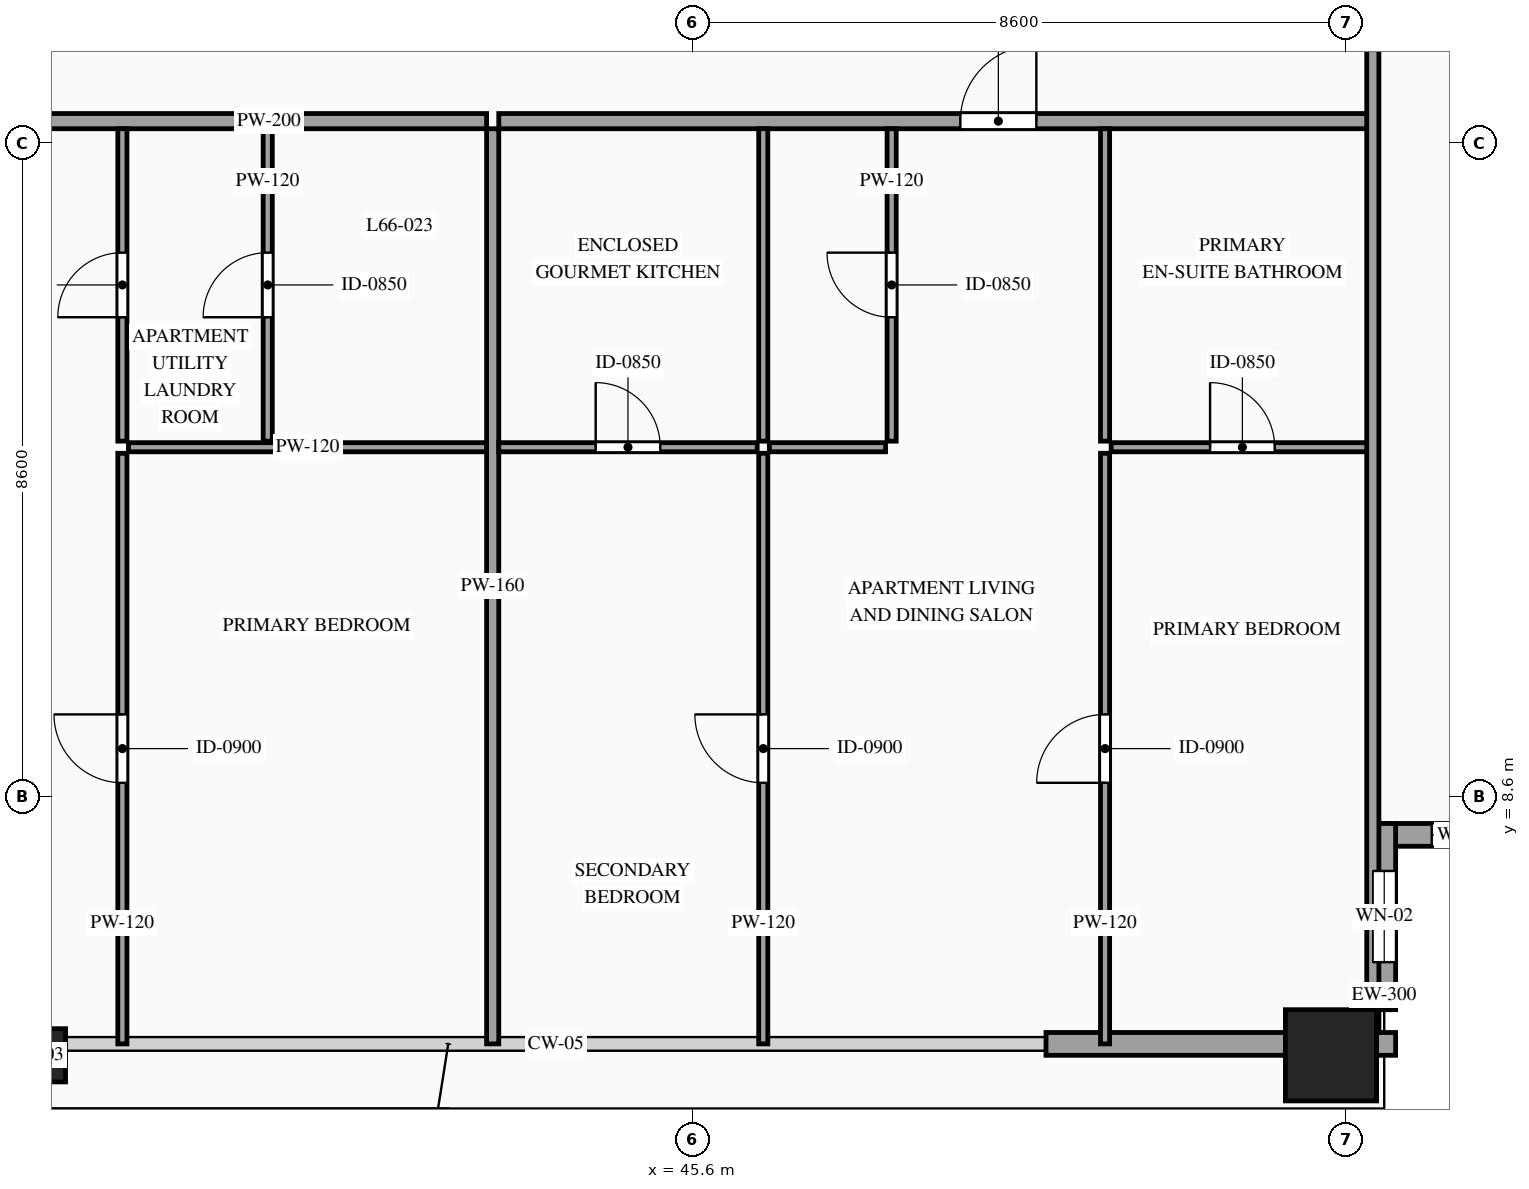
"""IFC4 building model, lengths in metres.
Left out: names, types, materials, properties, quantities, classifications, styles, units other than length and angle.
Written with IfcOpenShell. Run it as: python <this file> out.ifc"""

import sys

from ifc_helpers import new_model, si_unit, direction, frame, frame_2d, origin, origin_2d, place, context, subcontext, project, spatial, rectangle, hollow_rectangle, extrude, source, transform, mapped, element, fill, save


model = new_model("IFC4")
c1 = context("Model", 3, precision=1e-05, world=origin(), true_north=direction((0.0, 1.0)))
c2 = subcontext(c1, "Body", "Model", "MODEL_VIEW")
j1 = project(units=[si_unit("LENGTHUNIT", "METRE"), si_unit("PLANEANGLEUNIT", "RADIAN")], contexts=[c1])
p1 = place(None, origin())
s1 = spatial("IfcSite", under=j1, at=p1, CompositionType="ELEMENT")
p2 = place(p1, origin())
s2 = spatial("IfcBuilding", under=s1, at=p2, CompositionType="ELEMENT")
p3 = place(p2, frame((0.0, 0.0, 248.6)))
s3 = spatial("IfcBuildingStorey", under=s2, at=p3, CompositionType="ELEMENT", Elevation=248.6)
m1 = source(origin(), c2, "Body", "SweptSolid", [
    extrude(hollow_rectangle(XDim=0.7, YDim=0.7, WallThickness=0.032, at=origin_2d()), origin(), (0.0, 0.0, 1.0), 3.5),
])
p4 = place(p3, frame((37.0, 5.2, 0.0), z_axis=(0.0, 0.0, 1.0), x_axis=(1.0, 0.0, 0.0)))
e1 = element("IfcColumn", 1, at=p4, inside=s3, PredefinedType="COLUMN", context=c2, shape_type="MappedRepresentation", body=[
    mapped(m1, transform((0.0, 0.0, 0.0), scale=1.0)),
])
m2 = source(origin(), c2, "Body", "SweptSolid", [
    extrude(hollow_rectangle(XDim=1.2, YDim=1.2, WallThickness=0.055, at=origin_2d()), origin(), (0.0, 0.0, 1.0), 3.5),
])
p5 = place(p3, frame((54.0, 5.2, 0.0), z_axis=(0.0, 0.0, 1.0), x_axis=(1.0, 0.0, 0.0)))
e2 = element("IfcColumn", 2, at=p5, inside=s3, PredefinedType="COLUMN", context=c2, shape_type="MappedRepresentation", body=[
    mapped(m2, transform((0.0, 0.0, 0.0), scale=1.0)),
])
p6 = place(p3, frame((54.55, 8.1, 0.0), z_axis=(0.0, 0.0, 1.0), x_axis=(1.0, 0.0, 0.0)))
e3 = element("IfcWall", 3, at=p6, inside=s3, PredefinedType="SOLIDWALL", context=c2, shape_type="SweptSolid", body=[
    extrude(rectangle(XDim=2.45, YDim=0.3, at=frame_2d((1.225, 0.0))), origin(), (0.0, 0.0, 1.0), 3.28),
])
p7 = place(p6, frame((0.775, 0.0, 0.85)))
e4 = element("IfcOpeningElement", 4, at=p7, cuts=e3, PredefinedType="OPENING", context=c2, shape_type="SweptSolid", body=[
    extrude(rectangle(XDim=0.9, YDim=1.5, at=frame_2d((0.45, 0.75))), frame((0.0, 0.165, 0.0), z_axis=(0.0, -1.0, 0.0), x_axis=(1.0, 0.0, 0.0)), (0.0, 0.0, 1.0), 0.33),
])
p8 = place(p3, frame((54.7, 5.8, 0.0), z_axis=(0.0, 0.0, 1.0), x_axis=(0.0, 1.0, 0.0)))
e5 = element("IfcWall", 5, at=p8, inside=s3, PredefinedType="SOLIDWALL", context=c2, shape_type="SweptSolid", body=[
    extrude(rectangle(XDim=2.45, YDim=0.3, at=frame_2d((1.225, 0.0))), origin(), (0.0, 0.0, 1.0), 3.28),
])
p9 = place(p8, frame((0.625, 0.0, 0.85)))
e6 = element("IfcOpeningElement", 6, at=p9, cuts=e5, PredefinedType="OPENING", context=c2, shape_type="SweptSolid", body=[
    extrude(rectangle(XDim=1.2, YDim=2.1, at=frame_2d((0.6, 1.05))), frame((0.0, 0.165, 0.0), z_axis=(0.0, -1.0, 0.0), x_axis=(1.0, 0.0, 0.0)), (0.0, 0.0, 1.0), 0.33),
])
m3 = source(origin(), c2, "Body", "SweptSolid", [
    extrude(rectangle(XDim=0.25, YDim=0.3, at=frame_2d((0.125, 0.0))), origin(), (0.0, 0.0, 1.0), 3.28),
])
p10 = place(p3, frame((54.6, 5.35, 0.0), z_axis=(0.0, 0.0, 1.0), x_axis=(1.0, 0.0, 0.0)))
e7 = element("IfcWall", 7, at=p10, inside=s3, PredefinedType="SOLIDWALL", context=c2, shape_type="MappedRepresentation", body=[
    mapped(m3, transform((0.0, 0.0, 0.0), scale=1.0)),
])
m4 = source(origin(), c2, "Body", "SweptSolid", [
    extrude(rectangle(XDim=3.15, YDim=0.3, at=frame_2d((1.575, 0.0))), origin(), (0.0, 0.0, 1.0), 2.835),
])
p11 = place(p3, frame((50.25, 5.35, 0.0), z_axis=(0.0, 0.0, 1.0), x_axis=(1.0, 0.0, 0.0)))
e8 = element("IfcWall", 8, at=p11, inside=s3, PredefinedType="SOLIDWALL", context=c2, shape_type="MappedRepresentation", body=[
    mapped(m4, transform((0.0, 0.0, 0.0), scale=1.0)),
])
p12 = place(p3, frame((31.11, 17.49, 0.0), z_axis=(0.0, 0.0, 1.0), x_axis=(1.0, 0.0, 0.0)))
e9 = element("IfcWall", 9, at=p12, inside=s3, PredefinedType="PARTITIONING", context=c2, shape_type="SweptSolid", body=[
    extrude(rectangle(XDim=11.78, YDim=0.2, at=frame_2d((5.89, 0.0))), origin(), (0.0, 0.0, 1.0), 3.28),
])
p13 = place(p12, frame((4.801, 0.0, 0.0)))
e10 = element("IfcOpeningElement", 10, at=p13, cuts=e9, PredefinedType="OPENING", context=c2, shape_type="SweptSolid", body=[
    extrude(rectangle(XDim=1.0, YDim=2.2, at=frame_2d((0.5, 1.1))), frame((0.0, 0.115, 0.0), z_axis=(0.0, -1.0, 0.0), x_axis=(1.0, 0.0, 0.0)), (0.0, 0.0, 1.0), 0.23),
])
m5 = source(origin(), c2, "Body", "SweptSolid", [
    extrude(rectangle(XDim=12.04, YDim=0.16, at=frame_2d((6.02, 0.0))), origin(), (0.0, 0.0, 1.0), 3.28),
])
p14 = place(p3, frame((42.97, 5.35, 0.0), z_axis=(0.0, 0.0, 1.0), x_axis=(0.0, 1.0, 0.0)))
e11 = element("IfcWall", 11, at=p14, inside=s3, PredefinedType="PARTITIONING", context=c2, shape_type="MappedRepresentation", body=[
    mapped(m5, transform((0.0, 0.0, 0.0), scale=1.0)),
])
p15 = place(p3, frame((40.01, 13.28, 0.0), z_axis=(0.0, 0.0, 1.0), x_axis=(0.0, 1.0, 0.0)))
e12 = element("IfcWall", 12, at=p15, inside=s3, PredefinedType="PARTITIONING", context=c2, shape_type="SweptSolid", body=[
    extrude(rectangle(XDim=4.11, YDim=0.12, at=frame_2d((2.055, 0.0))), origin(), (0.0, 0.0, 1.0), 3.28),
])
p16 = place(p15, frame((1.63, 0.0, 0.0)))
e13 = element("IfcOpeningElement", 13, at=p16, cuts=e12, PredefinedType="OPENING", context=c2, shape_type="SweptSolid", body=[
    extrude(rectangle(XDim=0.85, YDim=2.1, at=frame_2d((0.425, 1.05))), frame((0.0, 0.075, 0.0), z_axis=(0.0, -1.0, 0.0), x_axis=(1.0, 0.0, 0.0)), (0.0, 0.0, 1.0), 0.15),
])
m6 = source(origin(), c2, "Body", "SweptSolid", [
    extrude(rectangle(XDim=4.712, YDim=0.12, at=frame_2d((2.356, 0.0))), origin(), (0.0, 0.0, 1.0), 3.28),
])
p17 = place(p3, frame((38.178, 13.2, 0.0), z_axis=(0.0, 0.0, 1.0), x_axis=(1.0, 0.0, 0.0)))
e14 = element("IfcWall", 14, at=p17, inside=s3, PredefinedType="PARTITIONING", context=c2, shape_type="MappedRepresentation", body=[
    mapped(m6, transform((0.0, 0.0, 0.0), scale=1.0)),
])
p18 = place(p3, frame((38.098, 5.35, 0.0), z_axis=(0.0, 0.0, 1.0), x_axis=(0.0, 1.0, 0.0)))
e15 = element("IfcWall", 15, at=p18, inside=s3, PredefinedType="PARTITIONING", context=c2, shape_type="SweptSolid", body=[
    extrude(rectangle(XDim=7.77, YDim=0.12, at=frame_2d((3.885, 0.0))), origin(), (0.0, 0.0, 1.0), 3.28),
])
p19 = place(p18, frame((3.435, 0.0, 0.0)))
e16 = element("IfcOpeningElement", 16, at=p19, cuts=e15, PredefinedType="OPENING", context=c2, shape_type="SweptSolid", body=[
    extrude(rectangle(XDim=0.9, YDim=2.15, at=frame_2d((0.45, 1.075))), frame((0.0, 0.075, 0.0), z_axis=(0.0, -1.0, 0.0), x_axis=(1.0, 0.0, 0.0)), (0.0, 0.0, 1.0), 0.15),
])
p20 = place(p3, frame((38.098, 13.28, 0.0), z_axis=(0.0, 0.0, 1.0), x_axis=(0.0, 1.0, 0.0)))
e17 = element("IfcWall", 17, at=p20, inside=s3, PredefinedType="PARTITIONING", context=c2, shape_type="SweptSolid", body=[
    extrude(rectangle(XDim=4.11, YDim=0.12, at=frame_2d((2.055, 0.0))), origin(), (0.0, 0.0, 1.0), 3.28),
])
p21 = place(p20, frame((1.63, 0.0, 0.0)))
e18 = element("IfcOpeningElement", 18, at=p21, cuts=e17, PredefinedType="OPENING", context=c2, shape_type="SweptSolid", body=[
    extrude(rectangle(XDim=0.85, YDim=2.1, at=frame_2d((0.425, 1.05))), frame((0.0, 0.075, 0.0), z_axis=(0.0, -1.0, 0.0), x_axis=(1.0, 0.0, 0.0)), (0.0, 0.0, 1.0), 0.15),
])
p22 = place(p3, frame((43.05, 17.49, 0.0), z_axis=(0.0, 0.0, 1.0), x_axis=(1.0, 0.0, 0.0)))
e19 = element("IfcWall", 19, at=p22, inside=s3, PredefinedType="PARTITIONING", context=c2, shape_type="SweptSolid", body=[
    extrude(rectangle(XDim=11.51, YDim=0.2, at=frame_2d((5.755, 0.0))), origin(), (0.0, 0.0, 1.0), 3.28),
])
p23 = place(p22, frame((6.073, 0.0, 0.0)))
e20 = element("IfcOpeningElement", 20, at=p23, cuts=e19, PredefinedType="OPENING", context=c2, shape_type="SweptSolid", body=[
    extrude(rectangle(XDim=1.0, YDim=2.2, at=frame_2d((0.5, 1.1))), frame((0.0, 0.115, 0.0), z_axis=(0.0, -1.0, 0.0), x_axis=(1.0, 0.0, 0.0)), (0.0, 0.0, 1.0), 0.23),
])
p24 = place(p3, frame((43.05, 13.2, 0.0), z_axis=(0.0, 0.0, 1.0), x_axis=(1.0, 0.0, 0.0)))
e21 = element("IfcWall", 21, at=p24, inside=s3, PredefinedType="PARTITIONING", context=c2, shape_type="SweptSolid", body=[
    extrude(rectangle(XDim=3.4, YDim=0.12, at=frame_2d((1.7, 0.0))), origin(), (0.0, 0.0, 1.0), 3.28),
])
p25 = place(p24, frame((1.275, 0.0, 0.0)))
e22 = element("IfcOpeningElement", 22, at=p25, cuts=e21, PredefinedType="OPENING", context=c2, shape_type="SweptSolid", body=[
    extrude(rectangle(XDim=0.85, YDim=2.1, at=frame_2d((0.425, 1.05))), frame((0.0, 0.075, 0.0), z_axis=(0.0, -1.0, 0.0), x_axis=(1.0, 0.0, 0.0)), (0.0, 0.0, 1.0), 0.15),
])
m7 = source(origin(), c2, "Body", "SweptSolid", [
    extrude(rectangle(XDim=4.11, YDim=0.12, at=frame_2d((2.055, 0.0))), origin(), (0.0, 0.0, 1.0), 3.28),
])
p26 = place(p3, frame((46.53, 13.28, 0.0), z_axis=(0.0, 0.0, 1.0), x_axis=(0.0, 1.0, 0.0)))
e23 = element("IfcWall", 23, at=p26, inside=s3, PredefinedType="PARTITIONING", context=c2, shape_type="MappedRepresentation", body=[
    mapped(m7, transform((0.0, 0.0, 0.0), scale=1.0)),
])
m8 = source(origin(), c2, "Body", "SweptSolid", [
    extrude(rectangle(XDim=1.529, YDim=0.12, at=frame_2d((0.764, 0.0))), origin(), (0.0, 0.0, 1.0), 3.28),
])
p27 = place(p3, frame((46.61, 13.2, 0.0), z_axis=(0.0, 0.0, 1.0), x_axis=(1.0, 0.0, 0.0)))
e24 = element("IfcWall", 24, at=p27, inside=s3, PredefinedType="PARTITIONING", context=c2, shape_type="MappedRepresentation", body=[
    mapped(m8, transform((0.0, 0.0, 0.0), scale=1.0)),
])
p28 = place(p3, frame((48.219, 13.28, 0.0), z_axis=(0.0, 0.0, 1.0), x_axis=(0.0, 1.0, 0.0)))
e25 = element("IfcWall", 25, at=p28, inside=s3, PredefinedType="PARTITIONING", context=c2, shape_type="SweptSolid", body=[
    extrude(rectangle(XDim=4.11, YDim=0.12, at=frame_2d((2.055, 0.0))), origin(), (0.0, 0.0, 1.0), 3.28),
])
p29 = place(p28, frame((1.63, 0.0, 0.0)))
e26 = element("IfcOpeningElement", 26, at=p29, cuts=e25, PredefinedType="OPENING", context=c2, shape_type="SweptSolid", body=[
    extrude(rectangle(XDim=0.85, YDim=2.1, at=frame_2d((0.425, 1.05))), frame((0.0, 0.075, 0.0), z_axis=(0.0, -1.0, 0.0), x_axis=(1.0, 0.0, 0.0)), (0.0, 0.0, 1.0), 0.15),
])
p30 = place(p3, frame((51.107, 13.2, 0.0), z_axis=(0.0, 0.0, 1.0), x_axis=(1.0, 0.0, 0.0)))
e27 = element("IfcWall", 27, at=p30, inside=s3, PredefinedType="PARTITIONING", context=c2, shape_type="SweptSolid", body=[
    extrude(rectangle(XDim=3.453, YDim=0.12, at=frame_2d((1.727, 0.0))), origin(), (0.0, 0.0, 1.0), 3.28),
])
p31 = place(p30, frame((1.302, 0.0, 0.0)))
e28 = element("IfcOpeningElement", 28, at=p31, cuts=e27, PredefinedType="OPENING", context=c2, shape_type="SweptSolid", body=[
    extrude(rectangle(XDim=0.85, YDim=2.1, at=frame_2d((0.425, 1.05))), frame((0.0, 0.075, 0.0), z_axis=(0.0, -1.0, 0.0), x_axis=(1.0, 0.0, 0.0)), (0.0, 0.0, 1.0), 0.15),
])
p32 = place(p3, frame((51.027, 13.28, 0.0), z_axis=(0.0, 0.0, 1.0), x_axis=(0.0, 1.0, 0.0)))
e29 = element("IfcWall", 29, at=p32, inside=s3, PredefinedType="PARTITIONING", context=c2, shape_type="MappedRepresentation", body=[
    mapped(m7, transform((0.0, 0.0, 0.0), scale=1.0)),
])
p33 = place(p3, frame((46.53, 5.35, 0.0), z_axis=(0.0, 0.0, 1.0), x_axis=(0.0, 1.0, 0.0)))
e30 = element("IfcWall", 30, at=p33, inside=s3, PredefinedType="PARTITIONING", context=c2, shape_type="SweptSolid", body=[
    extrude(rectangle(XDim=7.77, YDim=0.12, at=frame_2d((3.885, 0.0))), origin(), (0.0, 0.0, 1.0), 3.28),
])
p34 = place(p33, frame((3.435, 0.0, 0.0)))
e31 = element("IfcOpeningElement", 31, at=p34, cuts=e30, PredefinedType="OPENING", context=c2, shape_type="SweptSolid", body=[
    extrude(rectangle(XDim=0.9, YDim=2.15, at=frame_2d((0.45, 1.075))), frame((0.0, 0.075, 0.0), z_axis=(0.0, -1.0, 0.0), x_axis=(1.0, 0.0, 0.0)), (0.0, 0.0, 1.0), 0.15),
])
p35 = place(p3, frame((51.027, 5.35, 0.0), z_axis=(0.0, 0.0, 1.0), x_axis=(0.0, 1.0, 0.0)))
e32 = element("IfcWall", 32, at=p35, inside=s3, PredefinedType="PARTITIONING", context=c2, shape_type="SweptSolid", body=[
    extrude(rectangle(XDim=7.77, YDim=0.12, at=frame_2d((3.885, 0.0))), origin(), (0.0, 0.0, 1.0), 3.28),
])
p36 = place(p35, frame((3.435, 0.0, 0.0)))
e33 = element("IfcOpeningElement", 33, at=p36, cuts=e32, PredefinedType="OPENING", context=c2, shape_type="SweptSolid", body=[
    extrude(rectangle(XDim=0.9, YDim=2.15, at=frame_2d((0.45, 1.075))), frame((0.0, 0.075, 0.0), z_axis=(0.0, -1.0, 0.0), x_axis=(1.0, 0.0, 0.0)), (0.0, 0.0, 1.0), 0.15),
])
m9 = source(origin(), c2, "Body", "SweptSolid", [
    extrude(rectangle(XDim=26.69, YDim=0.16, at=frame_2d((13.345, 0.0))), origin(), (0.0, 0.0, 1.0), 3.28),
])
p37 = place(p3, frame((54.55, 5.5, 0.0), z_axis=(0.0, 0.0, 1.0), x_axis=(0.0, 1.0, 0.0)))
e34 = element("IfcWall", 34, at=p37, inside=s3, PredefinedType="PARTITIONING", context=c2, shape_type="MappedRepresentation", body=[
    mapped(m9, transform((0.0, 0.0, 0.0), scale=1.0)),
])
m10 = source(origin(), c2, "Body", "SweptSolid", [
    extrude(rectangle(XDim=0.9, YDim=1.5, at=frame_2d((0.45, 0.75))), frame((0.0, 0.03, 0.0), z_axis=(0.0, -1.0, 0.0), x_axis=(1.0, 0.0, 0.0)), (0.0, 0.0, 1.0), 0.06),
])
p38 = place(p7, origin())
e35 = element("IfcWindow", 35, at=p38, inside=s3, PartitioningType="SINGLE_PANEL", PredefinedType="WINDOW", context=c2, shape_type="MappedRepresentation", body=[
    mapped(m10, transform((0.0, 0.0, 0.0), scale=1.0)),
])
fill(e4, e35)
m11 = source(origin(), c2, "Body", "SweptSolid", [
    extrude(rectangle(XDim=1.2, YDim=2.1, at=frame_2d((0.6, 1.05))), frame((0.0, 0.03, 0.0), z_axis=(0.0, -1.0, 0.0), x_axis=(1.0, 0.0, 0.0)), (0.0, 0.0, 1.0), 0.06),
])
p39 = place(p9, origin())
e36 = element("IfcWindow", 36, at=p39, inside=s3, PartitioningType="SINGLE_PANEL", PredefinedType="WINDOW", context=c2, shape_type="MappedRepresentation", body=[
    mapped(m11, transform((0.0, 0.0, 0.0), scale=1.0)),
])
fill(e6, e36)
m12 = source(origin(), c2, "Body", "SweptSolid", [
    extrude(rectangle(XDim=0.85, YDim=2.1, at=frame_2d((0.425, 1.05))), frame((0.0, 0.025, 0.0), z_axis=(0.0, -1.0, 0.0), x_axis=(1.0, 0.0, 0.0)), (0.0, 0.0, 1.0), 0.05),
])
p40 = place(p16, origin())
e37 = element("IfcDoor", 37, at=p40, inside=s3, OperationType="SINGLE_SWING_LEFT", PredefinedType="DOOR", context=c2, shape_type="MappedRepresentation", body=[
    mapped(m12, transform((0.0, 0.0, 0.0), scale=1.0)),
])
fill(e13, e37)
m13 = source(origin(), c2, "Body", "SweptSolid", [
    extrude(rectangle(XDim=0.9, YDim=2.15, at=frame_2d((0.45, 1.075))), frame((0.0, 0.025, 0.0), z_axis=(0.0, -1.0, 0.0), x_axis=(1.0, 0.0, 0.0)), (0.0, 0.0, 1.0), 0.05),
])
p41 = place(p19, origin())
e38 = element("IfcDoor", 38, at=p41, inside=s3, OperationType="SINGLE_SWING_RIGHT", PredefinedType="DOOR", context=c2, shape_type="MappedRepresentation", body=[
    mapped(m13, transform((0.0, 0.0, 0.0), scale=1.0)),
])
fill(e16, e38)
p42 = place(p21, origin())
e39 = element("IfcDoor", 39, at=p42, inside=s3, OperationType="SINGLE_SWING_LEFT", PredefinedType="DOOR", context=c2, shape_type="MappedRepresentation", body=[
    mapped(m12, transform((0.0, 0.0, 0.0), scale=1.0)),
])
fill(e18, e39)
m14 = source(origin(), c2, "Body", "SweptSolid", [
    extrude(rectangle(XDim=1.0, YDim=2.2, at=frame_2d((0.5, 1.1))), frame((0.0, 0.025, 0.0), z_axis=(0.0, -1.0, 0.0), x_axis=(1.0, 0.0, 0.0)), (0.0, 0.0, 1.0), 0.05),
])
p43 = place(p23, origin())
e40 = element("IfcDoor", 40, at=p43, inside=s3, OperationType="SINGLE_SWING_RIGHT", PredefinedType="DOOR", context=c2, shape_type="MappedRepresentation", body=[
    mapped(m14, transform((0.0, 0.0, 0.0), scale=1.0)),
])
fill(e20, e40)
p44 = place(p25, origin())
e41 = element("IfcDoor", 41, at=p44, inside=s3, OperationType="SINGLE_SWING_LEFT", PredefinedType="DOOR", context=c2, shape_type="MappedRepresentation", body=[
    mapped(m12, transform((0.0, 0.0, 0.0), scale=1.0)),
])
fill(e22, e41)
p45 = place(p29, origin())
e42 = element("IfcDoor", 42, at=p45, inside=s3, OperationType="SINGLE_SWING_RIGHT", PredefinedType="DOOR", context=c2, shape_type="MappedRepresentation", body=[
    mapped(m12, transform((0.0, 0.0, 0.0), scale=1.0)),
])
fill(e26, e42)
p46 = place(p31, origin())
e43 = element("IfcDoor", 43, at=p46, inside=s3, OperationType="SINGLE_SWING_LEFT", PredefinedType="DOOR", context=c2, shape_type="MappedRepresentation", body=[
    mapped(m12, transform((0.0, 0.0, 0.0), scale=1.0)),
])
fill(e28, e43)
p47 = place(p34, origin())
e44 = element("IfcDoor", 44, at=p47, inside=s3, OperationType="SINGLE_SWING_RIGHT", PredefinedType="DOOR", context=c2, shape_type="MappedRepresentation", body=[
    mapped(m13, transform((0.0, 0.0, 0.0), scale=1.0)),
])
fill(e31, e44)
p48 = place(p36, origin())
e45 = element("IfcDoor", 45, at=p48, inside=s3, OperationType="SINGLE_SWING_LEFT", PredefinedType="DOOR", context=c2, shape_type="MappedRepresentation", body=[
    mapped(m13, transform((0.0, 0.0, 0.0), scale=1.0)),
])
fill(e33, e45)
save(model, sys.argv[1])
